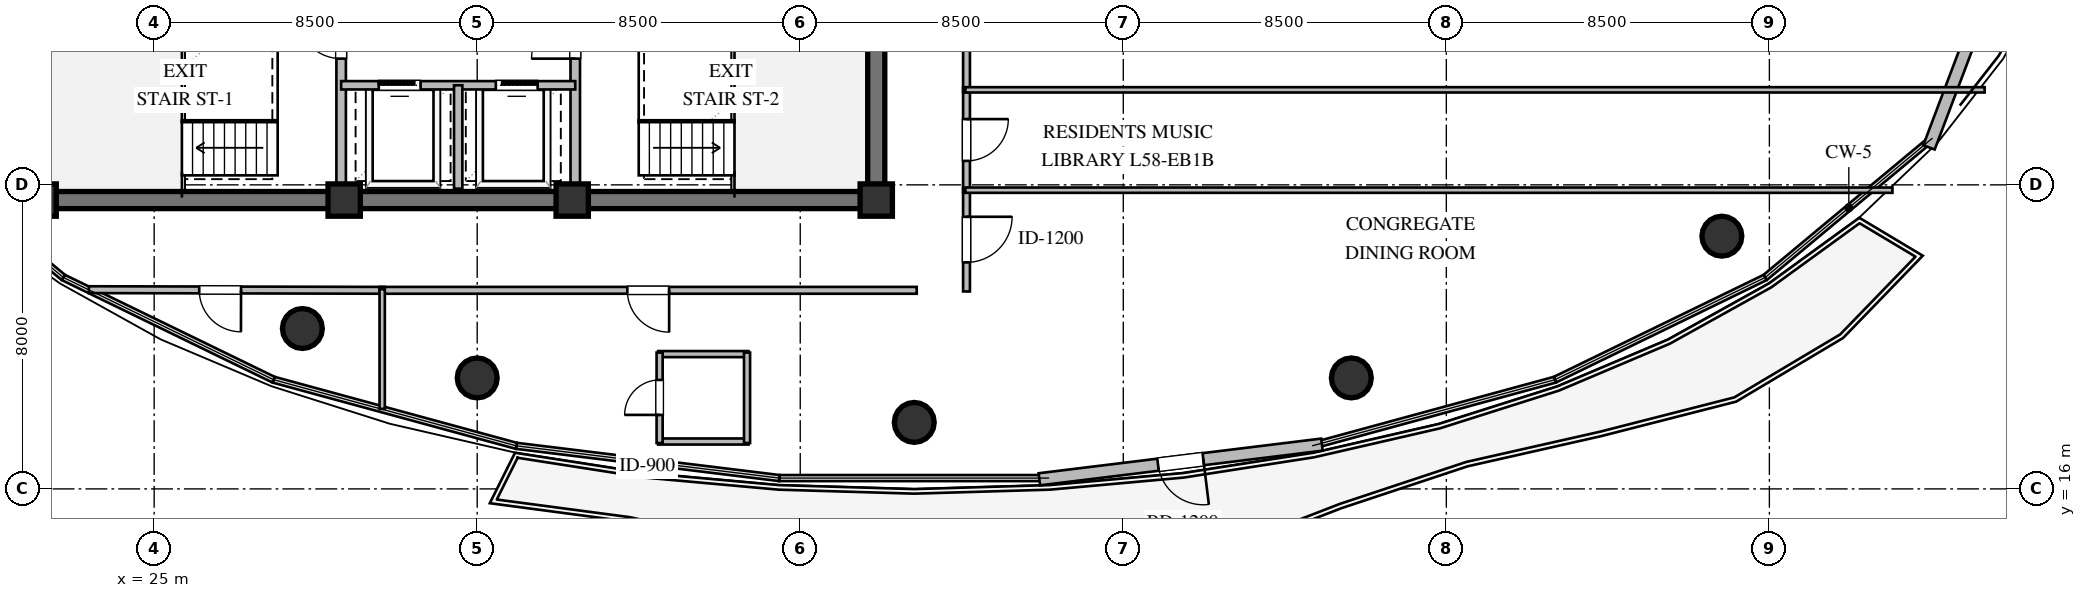
"""IFC4 building model, lengths in metres.
Left out: names, types, materials, properties, quantities, classifications, styles, units other than length and angle.
Written with IfcOpenShell. Run it as: python <this file> out.ifc"""

import sys

from ifc_helpers import new_model, si_unit, direction, frame, frame_2d, origin, origin_2d, place, context, subcontext, project, spatial, rectangle, circle, extrude, element, fill, save


model = new_model("IFC4")
c1 = context("Model", 3, precision=1e-05, world=origin(), true_north=direction((0.0, 1.0)))
c2 = subcontext(c1, "Body", "Model", "MODEL_VIEW")
j1 = project(units=[si_unit("LENGTHUNIT", "METRE"), si_unit("PLANEANGLEUNIT", "RADIAN")], contexts=[c1])
p1 = place(None, origin())
s1 = spatial("IfcSite", under=j1, at=p1, CompositionType="ELEMENT")
p2 = place(p1, origin())
s2 = spatial("IfcBuilding", under=s1, at=p2, CompositionType="ELEMENT")
p3 = place(p2, frame((0.0, 0.0, 220.8)))
s3 = spatial("IfcBuildingStorey", under=s2, at=p3, CompositionType="ELEMENT", Elevation=220.8)
p4 = place(p3, frame((21.775, 23.6, 0.0), z_axis=(0.0, 0.0, 1.0), x_axis=(1.0, 0.0, 0.0)))
e1 = element("IfcWall", 1, at=p4, inside=s3, PredefinedType="SHEAR", context=c2, shape_type="SweptSolid", body=[
    extrude(rectangle(XDim=22.45, YDim=0.45, at=frame_2d((11.225, 0.0))), origin(), (0.0, 0.0, 1.0), 3.36),
])
p5 = place(p3, frame((44.0, 23.825, 0.0), z_axis=(0.0, 0.0, 1.0), x_axis=(0.0, 1.0, 0.0)))
e2 = element("IfcWall", 2, at=p5, inside=s3, PredefinedType="SHEAR", context=c2, shape_type="SweptSolid", body=[
    extrude(rectangle(XDim=12.35, YDim=0.45, at=frame_2d((6.175, 0.0))), origin(), (0.0, 0.0, 1.0), 3.36),
])
p6 = place(p5, frame((8.675, 0.0, 0.0)))
e3 = element("IfcOpeningElement", 3, at=p6, cuts=e2, PredefinedType="OPENING", context=c2, shape_type="SweptSolid", body=[
    extrude(rectangle(XDim=1.5, YDim=2.15, at=frame_2d((0.75, 1.075))), frame((0.0, 0.235, 0.0), z_axis=(0.0, -1.0, 0.0), x_axis=(1.0, 0.0, 0.0)), (0.0, 0.0, 1.0), 0.47),
])
for number, where, z_axis, x_axis in (
    (4, (22.0, 23.6, 0.0), (0.0, 0.0, 1.0), (1.0, 0.0, 0.0)),
    (5, (30.0, 23.6, 0.0), (0.0, 0.0, 1.0), (1.0, 0.0, 0.0)),
    (6, (36.0, 23.6, 0.0), (0.0, 0.0, 1.0), (1.0, 0.0, 0.0)),
    (7, (44.0, 23.6, 0.0), (0.0, 0.0, 1.0), (1.0, 0.0, 0.0)),
):
    element("IfcColumn", number, at=place(p3, frame(where, z_axis=z_axis, x_axis=x_axis)), inside=s3, PredefinedType="COLUMN", context=c2, shape_type="SweptSolid", body=[
        extrude(rectangle(XDim=0.85, YDim=0.85, at=origin_2d()), origin(), (0.0, 0.0, 1.0), 3.6),
    ])
for number, where, z_axis, x_axis in (
    (8, (28.9, 20.22, 0.0), (0.0, 0.0, 1.0), (1.0, 0.0, 0.0)),
    (9, (33.5, 18.92, 0.0), (0.0, 0.0, 1.0), (1.0, 0.0, 0.0)),
    (10, (45.0, 17.75, 0.0), (0.0, 0.0, 1.0), (1.0, 0.0, 0.0)),
    (11, (56.5, 18.92, 0.0), (0.0, 0.0, 1.0), (1.0, 0.0, 0.0)),
    (12, (66.25, 22.65, 0.0), (0.0, 0.0, 1.0), (1.0, 0.0, 0.0)),
):
    element("IfcColumn", number, at=place(p3, frame(where, z_axis=z_axis, x_axis=x_axis)), inside=s3, PredefinedType="COLUMN", context=c2, shape_type="SweptSolid", body=[
        extrude(circle(Radius=0.525, at=origin_2d()), origin(), (0.0, 0.0, 1.0), 3.6),
    ])
p7 = place(p3, frame((76.712, 38.243, 0.0), z_axis=(0.0, 0.0, 1.0), x_axis=(-0.353659523244, -0.935374225441, 0.0)))
e13 = element("IfcWall", 13, at=p7, inside=s3, PredefinedType="STANDARD", context=c2, shape_type="SweptSolid", body=[
    extrude(rectangle(XDim=14.172, YDim=0.32, at=frame_2d((7.086, 0.0))), origin(), (0.0, 0.0, 1.0), 3.36),
])
p8 = place(p3, frame((55.727, 17.165, 0.0), z_axis=(0.0, 0.0, 1.0), x_axis=(-0.992559081031, -0.121763995755, 0.0)))
e14 = element("IfcWall", 14, at=p8, inside=s3, PredefinedType="STANDARD", context=c2, shape_type="SweptSolid", body=[
    extrude(rectangle(XDim=7.491, YDim=0.32, at=frame_2d((3.745, 0.0))), origin(), (0.0, 0.0, 1.0), 3.36),
])
p9 = place(p8, frame((3.145, 0.0, 0.0)))
e15 = element("IfcOpeningElement", 15, at=p9, cuts=e14, PredefinedType="OPENING", context=c2, shape_type="SweptSolid", body=[
    extrude(rectangle(XDim=1.2, YDim=2.15, at=frame_2d((0.6, 1.075))), frame((0.0, 0.17, 0.0), z_axis=(0.0, -1.0, 0.0), x_axis=(1.0, 0.0, 0.0)), (0.0, 0.0, 1.0), 0.34),
])
p10 = place(p3, frame((29.92, 23.9, 0.0), z_axis=(0.0, 0.0, 1.0), x_axis=(0.0, 1.0, 0.0)))
e16 = element("IfcWall", 16, at=p10, inside=s3, PredefinedType="SOLIDWALL", context=c2, shape_type="SweptSolid", body=[
    extrude(rectangle(XDim=5.4, YDim=0.25, at=frame_2d((2.7, 0.0))), origin(), (0.0, 0.0, 1.0), 3.36),
])
p11 = place(p10, frame((3.421, 0.0, 0.0)))
e17 = element("IfcOpeningElement", 17, at=p11, cuts=e16, PredefinedType="OPENING", context=c2, shape_type="SweptSolid", body=[
    extrude(rectangle(XDim=1.15, YDim=2.1, at=frame_2d((0.575, 1.05))), frame((0.0, 0.135, 0.0), z_axis=(0.0, -1.0, 0.0), x_axis=(1.0, 0.0, 0.0)), (0.0, 0.0, 1.0), 0.27),
])
p12 = place(p3, frame((36.08, 23.9, 0.0), z_axis=(0.0, 0.0, 1.0), x_axis=(0.0, 1.0, 0.0)))
e18 = element("IfcWall", 18, at=p12, inside=s3, PredefinedType="SOLIDWALL", context=c2, shape_type="SweptSolid", body=[
    extrude(rectangle(XDim=5.4, YDim=0.25, at=frame_2d((2.7, 0.0))), origin(), (0.0, 0.0, 1.0), 3.36),
])
p13 = place(p12, frame((3.421, 0.0, 0.0)))
e19 = element("IfcOpeningElement", 19, at=p13, cuts=e18, PredefinedType="OPENING", context=c2, shape_type="SweptSolid", body=[
    extrude(rectangle(XDim=1.15, YDim=2.1, at=frame_2d((0.575, 1.05))), frame((0.0, 0.135, 0.0), z_axis=(0.0, -1.0, 0.0), x_axis=(1.0, 0.0, 0.0)), (0.0, 0.0, 1.0), 0.27),
])
p14 = place(p3, frame((29.92, 26.62, 0.0), z_axis=(0.0, 0.0, 1.0), x_axis=(1.0, 0.0, 0.0)))
e20 = element("IfcWall", 20, at=p14, inside=s3, PredefinedType="SOLIDWALL", context=c2, shape_type="SweptSolid", body=[
    extrude(rectangle(XDim=6.16, YDim=0.22, at=frame_2d((3.08, 0.0))), origin(), (0.0, 0.0, 1.0), 3.36),
])
p15 = place(p14, frame((0.99, 0.0, 0.0)))
e21 = element("IfcOpeningElement", 21, at=p15, cuts=e20, PredefinedType="OPENING", context=c2, shape_type="SweptSolid", body=[
    extrude(rectangle(XDim=1.1, YDim=2.1, at=frame_2d((0.55, 1.05))), frame((0.0, 0.12, 0.0), z_axis=(0.0, -1.0, 0.0), x_axis=(1.0, 0.0, 0.0)), (0.0, 0.0, 1.0), 0.24),
])
p16 = place(p14, frame((4.07, 0.0, 0.0)))
e22 = element("IfcOpeningElement", 22, at=p16, cuts=e20, PredefinedType="OPENING", context=c2, shape_type="SweptSolid", body=[
    extrude(rectangle(XDim=1.1, YDim=2.1, at=frame_2d((0.55, 1.05))), frame((0.0, 0.12, 0.0), z_axis=(0.0, -1.0, 0.0), x_axis=(1.0, 0.0, 0.0)), (0.0, 0.0, 1.0), 0.24),
])
p17 = place(p3, frame((33.0, 23.9, 0.0), z_axis=(0.0, 0.0, 1.0), x_axis=(0.0, 1.0, 0.0)))
e23 = element("IfcWall", 23, at=p17, inside=s3, PredefinedType="SOLIDWALL", context=c2, shape_type="SweptSolid", body=[
    extrude(rectangle(XDim=2.72, YDim=0.22, at=frame_2d((1.36, 0.0))), origin(), (0.0, 0.0, 1.0), 3.36),
])
for number, where, z_axis, x_axis in (
    (24, (38.26, 17.247, 0.0), (0.0, 0.0, 1.0), (1.0, 0.0, 0.0)),
    (25, (38.26, 19.547, 0.0), (0.0, 0.0, 1.0), (1.0, 0.0, 0.0)),
):
    element("IfcWall", number, at=place(p3, frame(where, z_axis=z_axis, x_axis=x_axis)), inside=s3, PredefinedType="PLUMBINGWALL", context=c2, shape_type="SweptSolid", body=[
        extrude(rectangle(XDim=2.38, YDim=0.16, at=frame_2d((1.19, 0.0))), origin(), (0.0, 0.0, 1.0), 3.36),
    ])
p18 = place(p3, frame((38.3, 17.207, 0.0), z_axis=(0.0, 0.0, 1.0), x_axis=(0.0, 1.0, 0.0)))
e26 = element("IfcWall", 26, at=p18, inside=s3, PredefinedType="PLUMBINGWALL", context=c2, shape_type="SweptSolid", body=[
    extrude(rectangle(XDim=2.38, YDim=0.16, at=frame_2d((1.19, 0.0))), origin(), (0.0, 0.0, 1.0), 3.36),
])
p19 = place(p18, frame((0.74, 0.0, 0.0)))
e27 = element("IfcOpeningElement", 27, at=p19, cuts=e26, PredefinedType="OPENING", context=c2, shape_type="SweptSolid", body=[
    extrude(rectangle(XDim=0.92, YDim=2.1, at=frame_2d((0.46, 1.05))), frame((0.0, 0.09, 0.0), z_axis=(0.0, -1.0, 0.0), x_axis=(1.0, 0.0, 0.0)), (0.0, 0.0, 1.0), 0.18),
])
p20 = place(p3, frame((40.6, 17.207, 0.0), z_axis=(0.0, 0.0, 1.0), x_axis=(0.0, 1.0, 0.0)))
e28 = element("IfcWall", 28, at=p20, inside=s3, PredefinedType="PLUMBINGWALL", context=c2, shape_type="SweptSolid", body=[
    extrude(rectangle(XDim=2.38, YDim=0.16, at=frame_2d((1.19, 0.0))), origin(), (0.0, 0.0, 1.0), 3.36),
])
p21 = place(p3, frame((46.375, 23.925, 0.0), z_axis=(0.0, 0.0, 1.0), x_axis=(0.0, -1.0, 0.0)))
e29 = element("IfcWall", 29, at=p21, inside=s3, PredefinedType="PARTITIONING", context=c2, shape_type="SweptSolid", body=[
    extrude(rectangle(XDim=2.73, YDim=0.18, at=frame_2d((1.365, 0.0))), origin(), (0.0, 0.0, 1.0), 3.36),
])
p22 = place(p21, frame((0.765, 0.0, 0.0)))
e30 = element("IfcOpeningElement", 30, at=p22, cuts=e29, PredefinedType="OPENING", context=c2, shape_type="SweptSolid", body=[
    extrude(rectangle(XDim=1.2, YDim=2.15, at=frame_2d((0.6, 1.075))), frame((0.0, 0.1, 0.0), z_axis=(0.0, -1.0, 0.0), x_axis=(1.0, 0.0, 0.0)), (0.0, 0.0, 1.0), 0.2),
])
p23 = place(p3, frame((46.375, 26.565, 0.0), z_axis=(0.0, 0.0, 1.0), x_axis=(0.0, -1.0, 0.0)))
e31 = element("IfcWall", 31, at=p23, inside=s3, PredefinedType="PARTITIONING", context=c2, shape_type="SweptSolid", body=[
    extrude(rectangle(XDim=2.77, YDim=0.18, at=frame_2d((1.385, 0.0))), origin(), (0.0, 0.0, 1.0), 3.36),
])
p24 = place(p23, frame((0.835, 0.0, 0.0)))
e32 = element("IfcOpeningElement", 32, at=p24, cuts=e31, PredefinedType="OPENING", context=c2, shape_type="SweptSolid", body=[
    extrude(rectangle(XDim=1.1, YDim=2.1, at=frame_2d((0.55, 1.05))), frame((0.0, 0.1, 0.0), z_axis=(0.0, -1.0, 0.0), x_axis=(1.0, 0.0, 0.0)), (0.0, 0.0, 1.0), 0.2),
])
p25 = place(p3, frame((46.375, 30.315, 0.0), z_axis=(0.0, 0.0, 1.0), x_axis=(0.0, -1.0, 0.0)))
e33 = element("IfcWall", 33, at=p25, inside=s3, PredefinedType="PARTITIONING", context=c2, shape_type="SweptSolid", body=[
    extrude(rectangle(XDim=3.88, YDim=0.18, at=frame_2d((1.94, 0.0))), origin(), (0.0, 0.0, 1.0), 3.36),
])
p26 = place(p25, frame((1.39, 0.0, 0.0)))
e34 = element("IfcOpeningElement", 34, at=p26, cuts=e33, PredefinedType="OPENING", context=c2, shape_type="SweptSolid", body=[
    extrude(rectangle(XDim=1.1, YDim=2.1, at=frame_2d((0.55, 1.05))), frame((0.0, 0.1, 0.0), z_axis=(0.0, -1.0, 0.0), x_axis=(1.0, 0.0, 0.0)), (0.0, 0.0, 1.0), 0.2),
])
p27 = place(p3, frame((31.065, 21.225, 0.0), z_axis=(0.0, 0.0, 1.0), x_axis=(-0.999997658061, 0.002164225532, 0.0)))
e35 = element("IfcWall", 35, at=p27, inside=s3, PredefinedType="PARTITIONING", context=c2, shape_type="SweptSolid", body=[
    extrude(rectangle(XDim=7.784, YDim=0.18, at=frame_2d((3.892, 0.0))), origin(), (0.0, 0.0, 1.0), 2.806),
])
p28 = place(p27, frame((3.779, 0.0, 0.0)))
e36 = element("IfcOpeningElement", 36, at=p28, cuts=e35, PredefinedType="OPENING", context=c2, shape_type="SweptSolid", body=[
    extrude(rectangle(XDim=1.1, YDim=2.1, at=frame_2d((0.55, 1.05))), frame((0.0, 0.1, 0.0), z_axis=(0.0, -1.0, 0.0), x_axis=(1.0, 0.0, 0.0)), (0.0, 0.0, 1.0), 0.2),
])
p29 = place(p3, frame((45.065, 21.225, 0.0), z_axis=(0.0, 0.0, 1.0), x_axis=(-1.0, 0.0, 0.0)))
e37 = element("IfcWall", 37, at=p29, inside=s3, PredefinedType="PARTITIONING", context=c2, shape_type="SweptSolid", body=[
    extrude(rectangle(XDim=14.13, YDim=0.18, at=frame_2d((7.065, 0.0))), origin(), (0.0, 0.0, 1.0), 2.996),
])
p30 = place(p29, frame((6.515, 0.0, 0.0)))
e38 = element("IfcOpeningElement", 38, at=p30, cuts=e37, PredefinedType="OPENING", context=c2, shape_type="SweptSolid", body=[
    extrude(rectangle(XDim=1.1, YDim=2.1, at=frame_2d((0.55, 1.05))), frame((0.0, 0.1, 0.0), z_axis=(0.0, -1.0, 0.0), x_axis=(1.0, 0.0, 0.0)), (0.0, 0.0, 1.0), 0.2),
])
p31 = place(p3, frame((46.345, 23.86, 0.0), z_axis=(0.0, 0.0, 1.0), x_axis=(1.0, 0.0, 0.0)))
e39 = element("IfcWall", 39, at=p31, inside=s3, PredefinedType="PARTITIONING", context=c2, shape_type="SweptSolid", body=[
    extrude(rectangle(XDim=24.393, YDim=0.14, at=frame_2d((12.197, 0.0))), origin(), (0.0, 0.0, 1.0), 2.806),
])
p32 = place(p3, frame((46.345, 26.5, 0.0), z_axis=(0.0, 0.0, 1.0), x_axis=(1.0, 0.0, 0.0)))
e40 = element("IfcWall", 40, at=p32, inside=s3, PredefinedType="PARTITIONING", context=c2, shape_type="SweptSolid", body=[
    extrude(rectangle(XDim=26.819, YDim=0.14, at=frame_2d((13.41, 0.0))), origin(), (0.0, 0.0, 1.0), 2.806),
])
p33 = place(p3, frame((31.0, 21.255, 0.0), z_axis=(0.0, 0.0, 1.0), x_axis=(0.0, -1.0, 0.0)))
e41 = element("IfcWall", 41, at=p33, inside=s3, PredefinedType="PARTITIONING", context=c2, shape_type="SweptSolid", body=[
    extrude(rectangle(XDim=3.15, YDim=0.14, at=frame_2d((1.575, 0.0))), origin(), (0.0, 0.0, 1.0), 3.36),
])
p34 = place(p9, origin())
e42 = element("IfcDoor", 42, at=p34, inside=s3, OperationType="SINGLE_SWING_LEFT", PredefinedType="DOOR", context=c2, shape_type="SweptSolid", body=[
    extrude(rectangle(XDim=1.2, YDim=2.15, at=frame_2d((0.6, 1.075))), frame((0.0, 0.025, 0.0), z_axis=(0.0, -1.0, 0.0), x_axis=(1.0, 0.0, 0.0)), (0.0, 0.0, 1.0), 0.05),
])
fill(e15, e42)
p35 = place(p11, origin())
e43 = element("IfcDoor", 43, at=p35, inside=s3, OperationType="SINGLE_SWING_RIGHT", PredefinedType="DOOR", context=c2, shape_type="SweptSolid", body=[
    extrude(rectangle(XDim=1.15, YDim=2.1, at=frame_2d((0.575, 1.05))), frame((0.0, 0.025, 0.0), z_axis=(0.0, -1.0, 0.0), x_axis=(1.0, 0.0, 0.0)), (0.0, 0.0, 1.0), 0.05),
])
fill(e17, e43)
p36 = place(p13, origin())
e44 = element("IfcDoor", 44, at=p36, inside=s3, OperationType="SINGLE_SWING_LEFT", PredefinedType="DOOR", context=c2, shape_type="SweptSolid", body=[
    extrude(rectangle(XDim=1.15, YDim=2.1, at=frame_2d((0.575, 1.05))), frame((0.0, 0.025, 0.0), z_axis=(0.0, -1.0, 0.0), x_axis=(1.0, 0.0, 0.0)), (0.0, 0.0, 1.0), 0.05),
])
fill(e19, e44)
p37 = place(p15, origin())
e45 = element("IfcDoor", 45, at=p37, inside=s3, OperationType="SLIDING_TO_LEFT", PredefinedType="DOOR", context=c2, shape_type="SweptSolid", body=[
    extrude(rectangle(XDim=1.1, YDim=2.1, at=frame_2d((0.55, 1.05))), frame((0.0, 0.025, 0.0), z_axis=(0.0, -1.0, 0.0), x_axis=(1.0, 0.0, 0.0)), (0.0, 0.0, 1.0), 0.05),
])
fill(e21, e45)
p38 = place(p16, origin())
e46 = element("IfcDoor", 46, at=p38, inside=s3, OperationType="SLIDING_TO_RIGHT", PredefinedType="DOOR", context=c2, shape_type="SweptSolid", body=[
    extrude(rectangle(XDim=1.1, YDim=2.1, at=frame_2d((0.55, 1.05))), frame((0.0, 0.025, 0.0), z_axis=(0.0, -1.0, 0.0), x_axis=(1.0, 0.0, 0.0)), (0.0, 0.0, 1.0), 0.05),
])
fill(e22, e46)
p39 = place(p19, origin())
e47 = element("IfcDoor", 47, at=p39, inside=s3, OperationType="SINGLE_SWING_LEFT", PredefinedType="DOOR", context=c2, shape_type="SweptSolid", body=[
    extrude(rectangle(XDim=0.92, YDim=2.1, at=frame_2d((0.46, 1.05))), frame((0.0, 0.025, 0.0), z_axis=(0.0, -1.0, 0.0), x_axis=(1.0, 0.0, 0.0)), (0.0, 0.0, 1.0), 0.05),
])
fill(e27, e47)
p40 = place(p22, origin())
e48 = element("IfcDoor", 48, at=p40, inside=s3, OperationType="SINGLE_SWING_LEFT", PredefinedType="DOOR", context=c2, shape_type="SweptSolid", body=[
    extrude(rectangle(XDim=1.2, YDim=2.15, at=frame_2d((0.6, 1.075))), frame((0.0, 0.025, 0.0), z_axis=(0.0, -1.0, 0.0), x_axis=(1.0, 0.0, 0.0)), (0.0, 0.0, 1.0), 0.05),
])
fill(e30, e48)
p41 = place(p24, origin())
e49 = element("IfcDoor", 49, at=p41, inside=s3, OperationType="SINGLE_SWING_LEFT", PredefinedType="DOOR", context=c2, shape_type="SweptSolid", body=[
    extrude(rectangle(XDim=1.1, YDim=2.1, at=frame_2d((0.55, 1.05))), frame((0.0, 0.025, 0.0), z_axis=(0.0, -1.0, 0.0), x_axis=(1.0, 0.0, 0.0)), (0.0, 0.0, 1.0), 0.05),
])
fill(e32, e49)
p42 = place(p28, origin())
e50 = element("IfcDoor", 50, at=p42, inside=s3, OperationType="SINGLE_SWING_LEFT", PredefinedType="DOOR", context=c2, shape_type="SweptSolid", body=[
    extrude(rectangle(XDim=1.1, YDim=2.1, at=frame_2d((0.55, 1.05))), frame((0.0, 0.025, 0.0), z_axis=(0.0, -1.0, 0.0), x_axis=(1.0, 0.0, 0.0)), (0.0, 0.0, 1.0), 0.05),
])
fill(e36, e50)
p43 = place(p30, origin())
e51 = element("IfcDoor", 51, at=p43, inside=s3, OperationType="SINGLE_SWING_LEFT", PredefinedType="DOOR", context=c2, shape_type="SweptSolid", body=[
    extrude(rectangle(XDim=1.1, YDim=2.1, at=frame_2d((0.55, 1.05))), frame((0.0, 0.025, 0.0), z_axis=(0.0, -1.0, 0.0), x_axis=(1.0, 0.0, 0.0)), (0.0, 0.0, 1.0), 0.05),
])
fill(e38, e51)
save(model, sys.argv[1])
